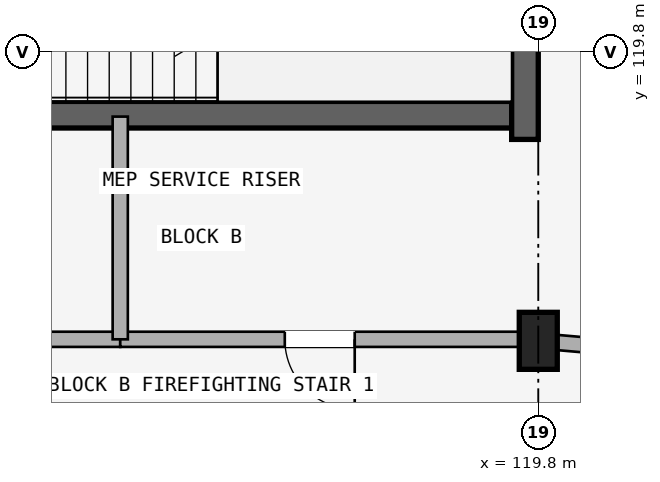
"""IFC4 building model, lengths in metres.
Left out: names, types, materials, properties, quantities, classifications, styles, units other than length and angle.
Written with IfcOpenShell. Run it as: python <this file> out.ifc"""

import sys

from ifc_helpers import new_model, si_unit, direction, frame, frame_2d, origin, origin_2d, place, context, subcontext, project, spatial, rectangle, extrude, element, fill, save


model = new_model("IFC4")
c1 = context("Model", 3, precision=1e-05, world=origin(), true_north=direction((0.0, 1.0)))
c2 = subcontext(c1, "Body", "Model", "MODEL_VIEW")
j1 = project(units=[si_unit("LENGTHUNIT", "METRE"), si_unit("PLANEANGLEUNIT", "RADIAN")], contexts=[c1])
p1 = place(None, origin())
s1 = spatial("IfcSite", under=j1, at=p1, CompositionType="ELEMENT")
p2 = place(p1, origin())
s2 = spatial("IfcBuilding", under=s1, at=p2, CompositionType="ELEMENT")
p3 = place(p2, frame((0.0, 0.0, 8.7)))
s3 = spatial("IfcBuildingStorey", under=s2, at=p3, CompositionType="ELEMENT", Elevation=8.7)
p4 = place(p3, frame((119.45, 118.975, 0.0), z_axis=(0.0, 0.0, 1.0), x_axis=(-1.0, 0.0, 0.0)))
e1 = element("IfcWall", 1, at=p4, inside=s3, PredefinedType="SHEAR", context=c2, shape_type="SweptSolid", body=[
    extrude(rectangle(XDim=8.075, YDim=0.35, at=frame_2d((4.038, 0.0))), origin(), (0.0, 0.0, 1.0), 2.93),
])
p5 = place(p4, frame((6.38, 0.0, 0.0)))
e2 = element("IfcOpeningElement", 2, at=p5, cuts=e1, PredefinedType="OPENING", context=c2, shape_type="SweptSolid", body=[
    extrude(rectangle(XDim=1.24, YDim=2.15, at=frame_2d((0.62, 1.075))), frame((0.0, 0.185, 0.0), z_axis=(0.0, -1.0, 0.0), x_axis=(1.0, 0.0, 0.0)), (0.0, 0.0, 1.0), 0.37),
])
p6 = place(p3, frame((119.625, 118.65, 0.0), z_axis=(0.0, 0.0, 1.0), x_axis=(0.0, 1.0, 0.0)))
e3 = element("IfcWall", 3, at=p6, inside=s3, PredefinedType="SHEAR", context=c2, shape_type="SweptSolid", body=[
    extrude(rectangle(XDim=3.6, YDim=0.35, at=frame_2d((1.8, 0.0))), origin(), (0.0, 0.0, 1.0), 2.93),
])
p7 = place(p3, frame((119.8, 116.0, 0.0), z_axis=(0.0, 0.0, 1.0), x_axis=(1.0, 0.0, 0.0)))
e4 = element("IfcColumn", 4, at=p7, inside=s3, PredefinedType="COLUMN", context=c2, shape_type="SweptSolid", body=[
    extrude(rectangle(XDim=0.5, YDim=0.75, at=origin_2d()), origin(), (0.0, 0.0, 1.0), 2.93),
])
p8 = place(p3, frame((114.3, 116.02, 0.0), z_axis=(0.0, 0.0, 1.0), x_axis=(-1.0, 0.0, 0.0)))
e5 = element("IfcWall", 5, at=p8, inside=s3, PredefinedType="STANDARD", context=c2, shape_type="SweptSolid", body=[
    extrude(rectangle(XDim=5.65, YDim=0.2, at=frame_2d((2.825, 0.0))), origin(), (0.0, 0.0, 1.0), 2.372),
])
p9 = place(p8, frame((1.923, 0.0, 0.0)))
e6 = element("IfcOpeningElement", 6, at=p9, cuts=e5, PredefinedType="OPENING", context=c2, shape_type="SweptSolid", body=[
    extrude(rectangle(XDim=1.24, YDim=2.15, at=frame_2d((0.62, 1.075))), frame((0.0, 0.11, 0.0), z_axis=(0.0, -1.0, 0.0), x_axis=(1.0, 0.0, 0.0)), (0.0, 0.0, 1.0), 0.22),
])
p10 = place(p3, frame((119.55, 116.02, 0.0), z_axis=(0.0, 0.0, 1.0), x_axis=(-1.0, 0.0, 0.0)))
e7 = element("IfcWall", 7, at=p10, inside=s3, PredefinedType="STANDARD", context=c2, shape_type="SweptSolid", body=[
    extrude(rectangle(XDim=5.25, YDim=0.2, at=frame_2d((2.625, 0.0))), origin(), (0.0, 0.0, 1.0), 2.372),
])
p11 = place(p10, frame((2.165, 0.0, 0.0)))
e8 = element("IfcOpeningElement", 8, at=p11, cuts=e7, PredefinedType="OPENING", context=c2, shape_type="SweptSolid", body=[
    extrude(rectangle(XDim=0.92, YDim=2.1, at=frame_2d((0.46, 1.05))), frame((0.0, 0.11, 0.0), z_axis=(0.0, -1.0, 0.0), x_axis=(1.0, 0.0, 0.0)), (0.0, 0.0, 1.0), 0.22),
])
p12 = place(p3, frame((114.3, 116.02, 0.0), z_axis=(0.0, 0.0, 1.0), x_axis=(0.0, 1.0, 0.0)))
e9 = element("IfcWall", 9, at=p12, inside=s3, PredefinedType="STANDARD", context=c2, shape_type="SweptSolid", body=[
    extrude(rectangle(XDim=2.93, YDim=0.2, at=frame_2d((1.465, 0.0))), origin(), (0.0, 0.0, 1.0), 2.372),
])
p13 = place(p3, frame((119.8, 116.0, 0.0), z_axis=(0.0, 0.0, 1.0), x_axis=(0.996193663584, -0.087167566415, 0.0)))
e10 = element("IfcWall", 10, at=p13, inside=s3, PredefinedType="STANDARD", context=c2, shape_type="SweptSolid", body=[
    extrude(rectangle(XDim=4.916, YDim=0.2, at=frame_2d((2.458, 0.0))), origin(), (0.0, 0.0, 1.0), 2.372),
])
p14 = place(p13, frame((1.958, 0.0, 0.0)))
e11 = element("IfcOpeningElement", 11, at=p14, cuts=e10, PredefinedType="OPENING", context=c2, shape_type="SweptSolid", body=[
    extrude(rectangle(XDim=1.0, YDim=2.15, at=frame_2d((0.5, 1.075))), frame((0.0, 0.11, 0.0), z_axis=(0.0, -1.0, 0.0), x_axis=(1.0, 0.0, 0.0)), (0.0, 0.0, 1.0), 0.22),
])
p15 = place(p11, frame((0.92, 0.0, 0.0), z_axis=(0.0, 0.0, 1.0), x_axis=(-1.0, 0.0, 0.0)))
e12 = element("IfcDoor", 12, at=p15, inside=s3, OperationType="SINGLE_SWING_RIGHT", PredefinedType="DOOR", context=c2, shape_type="SweptSolid", body=[
    extrude(rectangle(XDim=0.92, YDim=2.1, at=frame_2d((0.46, 1.05))), frame((0.0, 0.025, 0.0), z_axis=(0.0, -1.0, 0.0), x_axis=(1.0, 0.0, 0.0)), (0.0, 0.0, 1.0), 0.05),
])
fill(e8, e12)
save(model, sys.argv[1])
